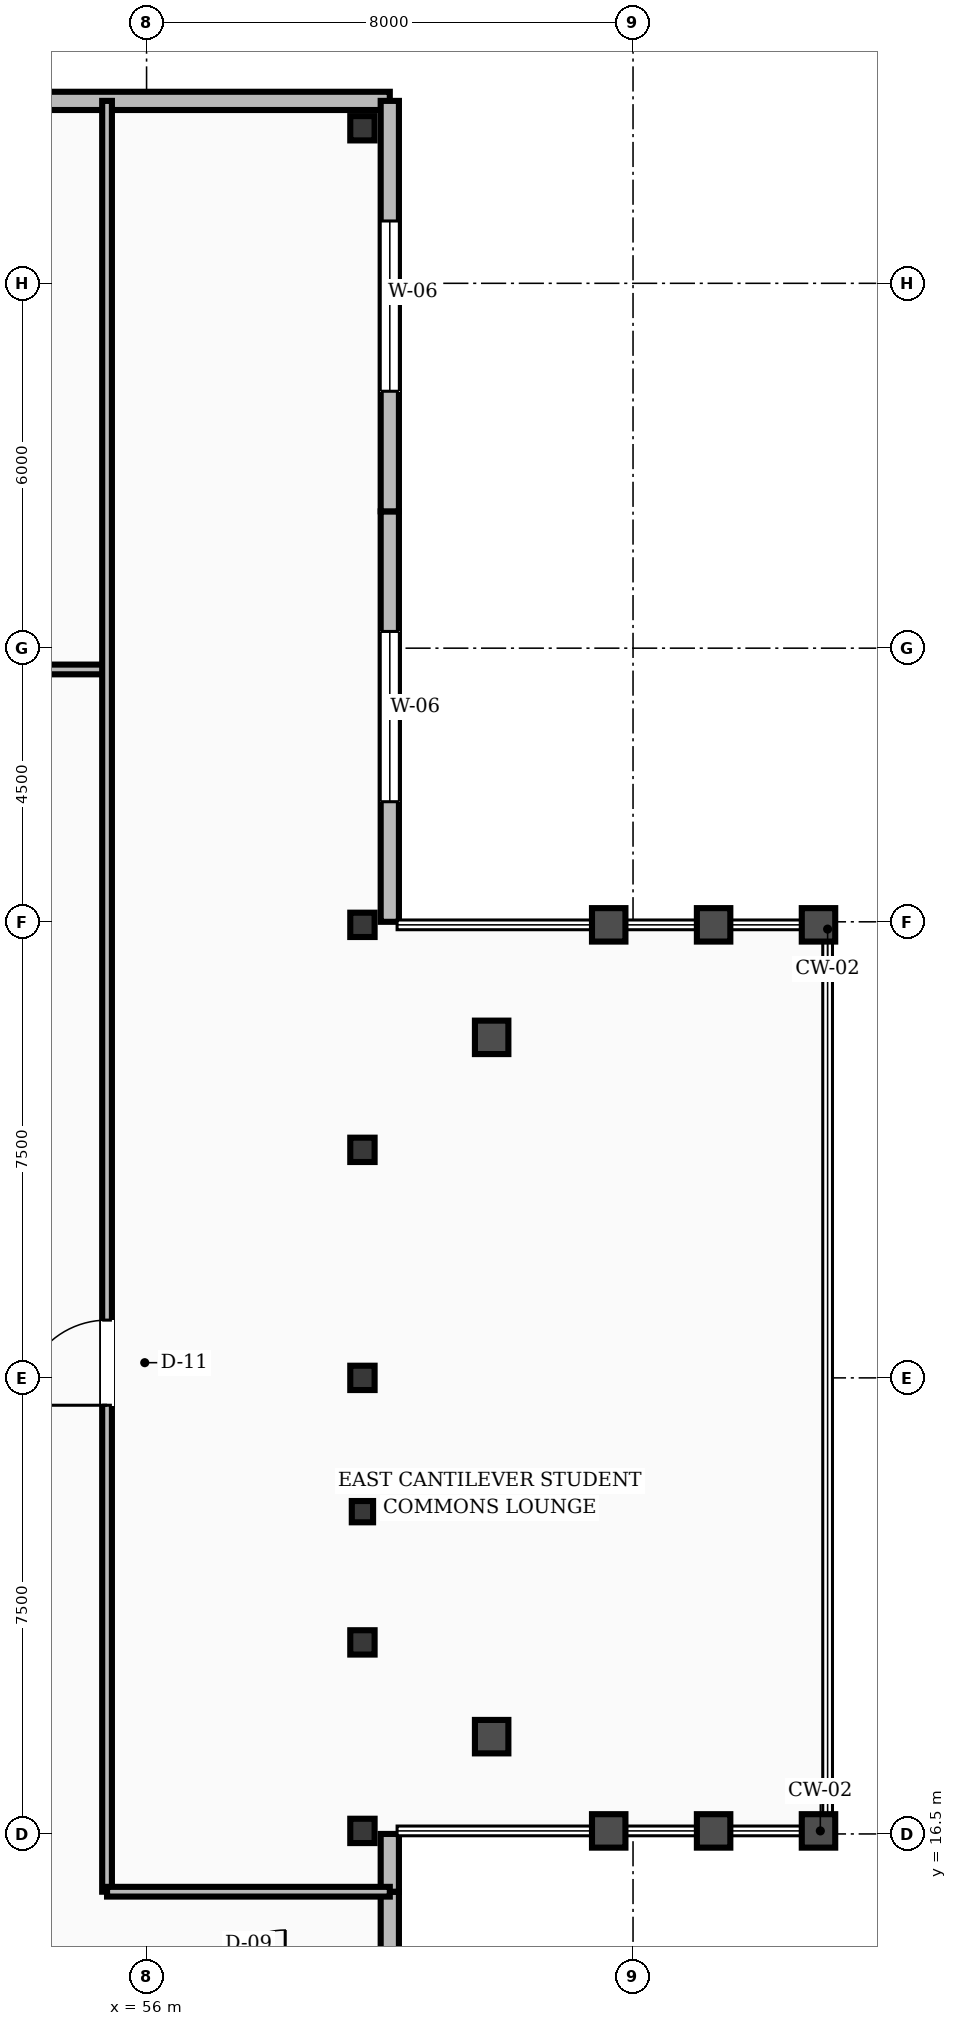
"""IFC4 building model, lengths in metres.
Left out: names, types, materials, properties, quantities, classifications, styles, units other than length and angle.
Written with IfcOpenShell. Run it as: python <this file> out.ifc"""

import sys

from ifc_helpers import new_model, si_unit, direction, frame, frame_2d, origin, origin_2d, place, context, subcontext, project, spatial, rectangle, hollow_rectangle, i_section, extrude, element, fill, save


model = new_model("IFC4")
c1 = context("Model", 3, precision=1e-05, world=origin(), true_north=direction((0.0, 1.0)))
c2 = subcontext(c1, "Body", "Model", "MODEL_VIEW")
j1 = project(units=[si_unit("LENGTHUNIT", "METRE"), si_unit("PLANEANGLEUNIT", "RADIAN")], contexts=[c1])
p1 = place(None, origin())
s1 = spatial("IfcSite", under=j1, at=p1, CompositionType="ELEMENT")
p2 = place(p1, origin())
s2 = spatial("IfcBuilding", under=s1, at=p2, CompositionType="ELEMENT")
p3 = place(p2, frame((0.0, 0.0, 5.2)))
s3 = spatial("IfcBuildingStorey", under=s2, at=p3, CompositionType="ELEMENT", Elevation=5.2)
for number, where, z_axis, x_axis in (
    (1, (59.55, 44.55, 0.0), (0.0, 0.0, 1.0), (1.0, 0.0, 0.0)),
    (2, (59.55, 16.55, 0.0), (0.0, 0.0, 1.0), (1.0, 0.0, 0.0)),
    (3, (59.55, 19.65, 0.0), (0.0, 0.0, 1.0), (1.0, 0.0, 0.0)),
    (4, (59.55, 24.0, 0.0), (0.0, 0.0, 1.0), (1.0, 0.0, 0.0)),
    (5, (59.55, 27.75, 0.0), (0.0, 0.0, 1.0), (1.0, 0.0, 0.0)),
    (6, (59.55, 31.45, 0.0), (0.0, 0.0, 1.0), (1.0, 0.0, 0.0)),
):
    element("IfcColumn", number, at=place(p3, frame(where, z_axis=z_axis, x_axis=x_axis)), inside=s3, PredefinedType="COLUMN", context=c2, shape_type="SweptSolid", body=[
        extrude(i_section(OverallWidth=0.4, OverallDepth=0.4, WebThickness=0.013, FlangeThickness=0.021, FilletRadius=0.018, at=origin_2d()), origin(), (0.0, 0.0, 1.0), 4.8),
    ])
p4 = place(p3, frame((59.55, 21.8, 0.0), z_axis=(0.0, 0.0, 1.0), x_axis=(1.0, 0.0, 0.0)))
e7 = element("IfcColumn", 7, at=p4, inside=s3, PredefinedType="PILASTER", context=c2, shape_type="SweptSolid", body=[
    extrude(hollow_rectangle(XDim=0.35, YDim=0.35, WallThickness=0.016, at=origin_2d()), origin(), (0.0, 0.0, 1.0), 4.8),
])
p5 = place(p3, frame((60.0, 45.0, 0.0), z_axis=(0.0, 0.0, 1.0), x_axis=(-1.0, 0.0, 0.0)))
e8 = element("IfcWall", 8, at=p5, inside=s3, PredefinedType="STANDARD", context=c2, shape_type="SweptSolid", body=[
    extrude(rectangle(XDim=8.0, YDim=0.3, at=frame_2d((4.0, 0.0))), origin(), (0.0, 0.0, 1.0), 3.57),
])
p6 = place(p3, frame((60.0, 13.72, 0.0), z_axis=(0.0, 0.0, 1.0), x_axis=(0.0, 1.0, 0.0)))
e9 = element("IfcWall", 9, at=p6, inside=s3, PredefinedType="STANDARD", context=c2, shape_type="SweptSolid", body=[
    extrude(rectangle(XDim=1.83, YDim=0.3, at=frame_2d((0.915, 0.0))), origin(), (0.0, 0.0, 1.0), 3.57),
])
p7 = place(p3, frame((60.0, 15.55, 0.0), z_axis=(0.0, 0.0, 1.0), x_axis=(0.0, 1.0, 0.0)))
e10 = element("IfcWall", 10, at=p7, inside=s3, PredefinedType="STANDARD", context=c2, shape_type="SweptSolid", body=[
    extrude(rectangle(XDim=0.95, YDim=0.3, at=frame_2d((0.475, 0.0))), origin(), (0.0, 0.0, 1.0), 3.57),
])
p8 = place(p3, frame((60.0, 31.5, 0.0), z_axis=(0.0, 0.0, 1.0), x_axis=(0.0, 1.0, 0.0)))
e11 = element("IfcWall", 11, at=p8, inside=s3, PredefinedType="STANDARD", context=c2, shape_type="SweptSolid", body=[
    extrude(rectangle(XDim=6.75, YDim=0.3, at=frame_2d((3.375, 0.0))), origin(), (0.0, 0.0, 1.0), 3.57),
])
p9 = place(p8, frame((1.975, 0.0, 0.85)))
e12 = element("IfcOpeningElement", 12, at=p9, cuts=e11, PredefinedType="OPENING", context=c2, shape_type="SweptSolid", body=[
    extrude(rectangle(XDim=2.8, YDim=2.3, at=frame_2d((1.4, 1.15))), frame((0.0, 0.16, 0.0), z_axis=(0.0, -1.0, 0.0), x_axis=(1.0, 0.0, 0.0)), (0.0, 0.0, 1.0), 0.32),
])
p10 = place(p3, frame((60.0, 38.25, 0.0), z_axis=(0.0, 0.0, 1.0), x_axis=(0.0, 1.0, 0.0)))
e13 = element("IfcWall", 13, at=p10, inside=s3, PredefinedType="STANDARD", context=c2, shape_type="SweptSolid", body=[
    extrude(rectangle(XDim=6.75, YDim=0.3, at=frame_2d((3.375, 0.0))), origin(), (0.0, 0.0, 1.0), 3.57),
])
p11 = place(p10, frame((1.975, 0.0, 0.85)))
e14 = element("IfcOpeningElement", 14, at=p11, cuts=e13, PredefinedType="OPENING", context=c2, shape_type="SweptSolid", body=[
    extrude(rectangle(XDim=2.8, YDim=2.3, at=frame_2d((1.4, 1.15))), frame((0.0, 0.16, 0.0), z_axis=(0.0, -1.0, 0.0), x_axis=(1.0, 0.0, 0.0)), (0.0, 0.0, 1.0), 0.32),
])
p12 = place(p3, frame((8.65, 35.65, 0.0), z_axis=(0.0, 0.0, 1.0), x_axis=(1.0, 0.0, 0.0)))
e15 = element("IfcWall", 15, at=p12, inside=s3, PredefinedType="SOLIDWALL", context=c2, shape_type="SweptSolid", body=[
    extrude(rectangle(XDim=46.7, YDim=0.16, at=frame_2d((23.35, 0.0))), origin(), (0.0, 0.0, 1.0), 3.52),
])
p13 = place(p12, frame((10.0, 0.0, 0.0)))
e16 = element("IfcOpeningElement", 16, at=p13, cuts=e15, PredefinedType="OPENING", context=c2, shape_type="SweptSolid", body=[
    extrude(rectangle(XDim=1.4, YDim=2.15, at=frame_2d((0.7, 1.075))), frame((0.0, 0.09, 0.0), z_axis=(0.0, -1.0, 0.0), x_axis=(1.0, 0.0, 0.0)), (0.0, 0.0, 1.0), 0.18),
])
p14 = place(p12, frame((28.0, 0.0, 0.0)))
e17 = element("IfcOpeningElement", 17, at=p14, cuts=e15, PredefinedType="OPENING", context=c2, shape_type="SweptSolid", body=[
    extrude(rectangle(XDim=1.2, YDim=2.1, at=frame_2d((0.6, 1.05))), frame((0.0, 0.09, 0.0), z_axis=(0.0, -1.0, 0.0), x_axis=(1.0, 0.0, 0.0)), (0.0, 0.0, 1.0), 0.18),
])
p15 = place(p12, frame((43.0, 0.0, 0.0)))
e18 = element("IfcOpeningElement", 18, at=p15, cuts=e15, PredefinedType="OPENING", context=c2, shape_type="SweptSolid", body=[
    extrude(rectangle(XDim=0.95, YDim=2.1, at=frame_2d((0.475, 1.05))), frame((0.0, 0.09, 0.0), z_axis=(0.0, -1.0, 0.0), x_axis=(1.0, 0.0, 0.0)), (0.0, 0.0, 1.0), 0.18),
])
p16 = place(p3, frame((55.35, 15.55, 0.0), z_axis=(0.0, 0.0, 1.0), x_axis=(0.0, 1.0, 0.0)))
e19 = element("IfcWall", 19, at=p16, inside=s3, PredefinedType="SOLIDWALL", context=c2, shape_type="SweptSolid", body=[
    extrude(rectangle(XDim=29.45, YDim=0.16, at=frame_2d((14.725, 0.0))), origin(), (0.0, 0.0, 1.0), 3.52),
])
p17 = place(p16, frame((8.0, 0.0, 0.0)))
e20 = element("IfcOpeningElement", 20, at=p17, cuts=e19, PredefinedType="OPENING", context=c2, shape_type="SweptSolid", body=[
    extrude(rectangle(XDim=1.4, YDim=2.15, at=frame_2d((0.7, 1.075))), frame((0.0, 0.09, 0.0), z_axis=(0.0, -1.0, 0.0), x_axis=(1.0, 0.0, 0.0)), (0.0, 0.0, 1.0), 0.18),
])
p18 = place(p3, frame((55.35, 15.55, 0.0), z_axis=(0.0, 0.0, 1.0), x_axis=(1.0, 0.0, 0.0)))
e21 = element("IfcWall", 21, at=p18, inside=s3, PredefinedType="SOLIDWALL", context=c2, shape_type="SweptSolid", body=[
    extrude(rectangle(XDim=4.65, YDim=0.16, at=frame_2d((2.325, 0.0))), origin(), (0.0, 0.0, 1.0), 3.52),
])
p19 = place(p9, origin())
e22 = element("IfcWindow", 22, at=p19, inside=s3, PartitioningType="SINGLE_PANEL", PredefinedType="WINDOW", context=c2, shape_type="SweptSolid", body=[
    extrude(rectangle(XDim=2.8, YDim=2.3, at=frame_2d((1.4, 1.15))), frame((0.0, 0.03, 0.0), z_axis=(0.0, -1.0, 0.0), x_axis=(1.0, 0.0, 0.0)), (0.0, 0.0, 1.0), 0.06),
])
fill(e12, e22)
p20 = place(p11, origin())
e23 = element("IfcWindow", 23, at=p20, inside=s3, PartitioningType="SINGLE_PANEL", PredefinedType="WINDOW", context=c2, shape_type="SweptSolid", body=[
    extrude(rectangle(XDim=2.8, YDim=2.3, at=frame_2d((1.4, 1.15))), frame((0.0, 0.03, 0.0), z_axis=(0.0, -1.0, 0.0), x_axis=(1.0, 0.0, 0.0)), (0.0, 0.0, 1.0), 0.06),
])
fill(e14, e23)
p21 = place(p17, origin())
e24 = element("IfcDoor", 24, at=p21, inside=s3, OperationType="SINGLE_SWING_LEFT", PredefinedType="DOOR", context=c2, shape_type="SweptSolid", body=[
    extrude(rectangle(XDim=1.4, YDim=2.15, at=frame_2d((0.7, 1.075))), frame((0.0, 0.025, 0.0), z_axis=(0.0, -1.0, 0.0), x_axis=(1.0, 0.0, 0.0)), (0.0, 0.0, 1.0), 0.05),
])
fill(e20, e24)
save(model, sys.argv[1])
